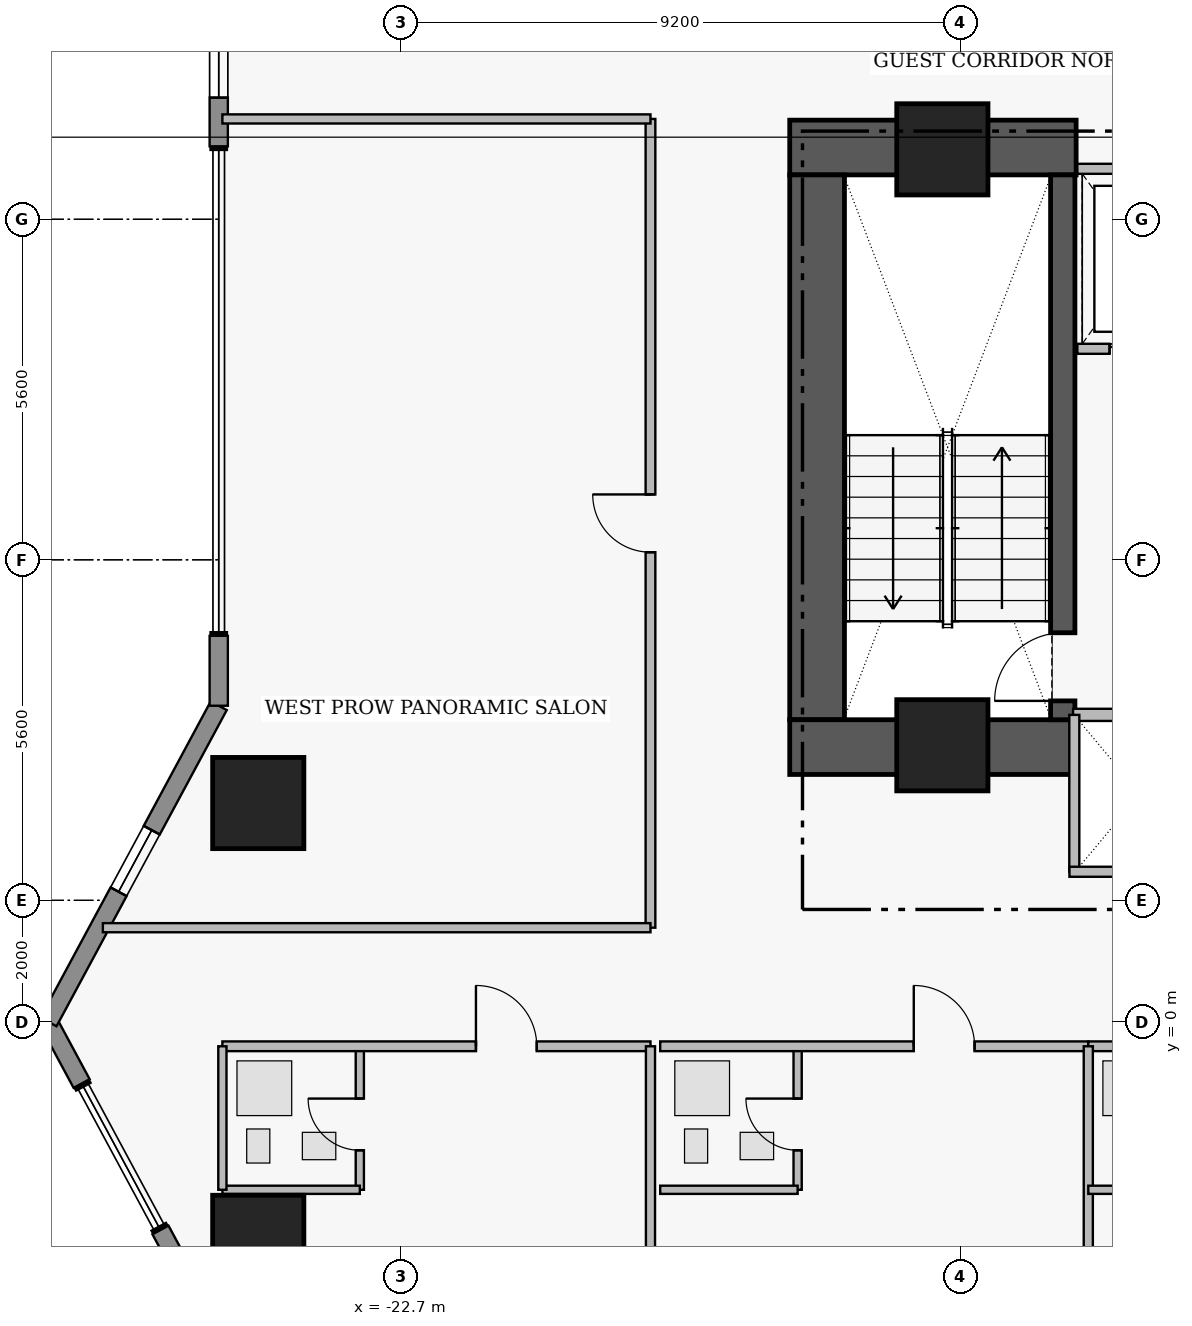
"""IFC4 building model, lengths in metres.
Left out: names, types, materials, properties, quantities, classifications, styles, units other than length and angle.
Written with IfcOpenShell. Run it as: python <this file> out.ifc"""

import sys

from ifc_helpers import new_model, si_unit, direction, frame, frame_2d, origin, origin_2d, place, context, subcontext, project, spatial, rectangle, extrude, element, fill, save


model = new_model("IFC4")
c1 = context("Model", 3, precision=1e-05, world=origin(), true_north=direction((0.0, 1.0)))
c2 = subcontext(c1, "Body", "Model", "MODEL_VIEW")
j1 = project(units=[si_unit("LENGTHUNIT", "METRE"), si_unit("PLANEANGLEUNIT", "RADIAN")], contexts=[c1])
p1 = place(None, origin())
s1 = spatial("IfcSite", under=j1, at=p1, CompositionType="ELEMENT")
p2 = place(p1, origin())
s2 = spatial("IfcBuilding", under=s1, at=p2, CompositionType="ELEMENT")
p3 = place(p2, frame((0.0, 0.0, 49.5)))
s3 = spatial("IfcBuildingStorey", under=s2, at=p3, CompositionType="ELEMENT", Elevation=49.5)
p4 = place(p3, frame((-16.31, 14.38, 0.0), z_axis=(0.0, 0.0, 1.0), x_axis=(1.0, 0.0, 0.0)))
e1 = element("IfcWall", 1, at=p4, inside=s3, PredefinedType="SHEAR", context=c2, shape_type="SweptSolid", body=[
    extrude(rectangle(XDim=4.71, YDim=0.9, at=frame_2d((2.355, 0.0))), origin(), (0.0, 0.0, 1.0), 3.46),
])
p5 = place(p3, frame((-15.86, 4.97, 0.0), z_axis=(0.0, 0.0, 1.0), x_axis=(0.0, 1.0, 0.0)))
e2 = element("IfcWall", 2, at=p5, inside=s3, PredefinedType="SHEAR", context=c2, shape_type="SweptSolid", body=[
    extrude(rectangle(XDim=8.96, YDim=0.9, at=frame_2d((4.48, 0.0))), origin(), (0.0, 0.0, 1.0), 3.46),
])
p6 = place(p3, frame((-16.31, 4.52, 0.0), z_axis=(0.0, 0.0, 1.0), x_axis=(1.0, 0.0, 0.0)))
e3 = element("IfcWall", 3, at=p6, inside=s3, PredefinedType="SHEAR", context=c2, shape_type="SweptSolid", body=[
    extrude(rectangle(XDim=4.71, YDim=0.9, at=frame_2d((2.355, 0.0))), origin(), (0.0, 0.0, 1.0), 3.46),
])
p7 = place(p3, frame((-11.82, 4.97, 0.0), z_axis=(0.0, 0.0, 1.0), x_axis=(0.0, 1.0, 0.0)))
e4 = element("IfcWall", 4, at=p7, inside=s3, PredefinedType="SHEAR", context=c2, shape_type="SweptSolid", body=[
    extrude(rectangle(XDim=8.96, YDim=0.4, at=frame_2d((4.48, 0.0))), origin(), (0.0, 0.0, 1.0), 3.46),
])
p8 = place(p7, frame((0.31, 0.0, 0.0)))
e5 = element("IfcOpeningElement", 5, at=p8, cuts=e4, PredefinedType="OPENING", context=c2, shape_type="SweptSolid", body=[
    extrude(rectangle(XDim=1.12, YDim=2.22, at=frame_2d((0.56, 1.11))), frame((0.0, 0.21, 0.0), z_axis=(0.0, -1.0, 0.0), x_axis=(1.0, 0.0, 0.0)), (0.0, 0.0, 1.0), 0.42),
])
for number, where, z_axis, x_axis in (
    (6, (-13.8, 14.35, 0.0), (0.0, 0.0, 1.0), (1.0, 0.0, 0.0)),
    (7, (-13.8, 4.55, 0.0), (0.0, 0.0, 1.0), (1.0, 0.0, 0.0)),
    (8, (-25.05, -3.6, 0.0), (0.0, 0.0, 1.0), (1.0, 0.0, 0.0)),
    (9, (-25.05, 3.6, 0.0), (0.0, 0.0, 1.0), (1.0, 0.0, 0.0)),
):
    element("IfcColumn", number, at=place(p3, frame(where, z_axis=z_axis, x_axis=x_axis)), inside=s3, PredefinedType="COLUMN", context=c2, shape_type="SweptSolid", body=[
        extrude(rectangle(XDim=1.5, YDim=1.5, at=origin_2d()), origin(), (0.0, 0.0, 1.0), 3.65),
    ])
p9 = place(p3, frame((-25.7, -5.2, 0.0), z_axis=(0.0, 0.0, 1.0), x_axis=(-0.474121438562, 0.88045946045, 0.0)))
e10 = element("IfcWall", 10, at=p9, inside=s3, PredefinedType="STANDARD", context=c2, shape_type="SweptSolid", body=[
    extrude(rectangle(XDim=2.021, YDim=0.3, at=frame_2d((1.01, 0.0))), origin(), (0.0, 0.0, 1.0), 3.43),
])
p10 = place(p3, frame((-27.955, -1.012, 0.0), z_axis=(0.0, 0.0, 1.0), x_axis=(-0.474099823035, 0.880471099922, 0.0)))
e11 = element("IfcWall", 11, at=p10, inside=s3, PredefinedType="STANDARD", context=c2, shape_type="SweptSolid", body=[
    extrude(rectangle(XDim=1.15, YDim=0.3, at=frame_2d((0.575, 0.0))), origin(), (0.0, 0.0, 1.0), 3.43),
])
p11 = place(p3, frame((-28.5, 0.0, 0.0), z_axis=(0.0, 0.0, 1.0), x_axis=(0.474109683532, 0.880465790352, 0.0)))
e12 = element("IfcWall", 12, at=p11, inside=s3, PredefinedType="STANDARD", context=c2, shape_type="SweptSolid", body=[
    extrude(rectangle(XDim=5.906, YDim=0.3, at=frame_2d((2.953, 0.0))), origin(), (0.0, 0.0, 1.0), 3.43),
])
p12 = place(p11, frame((2.432, 0.0, 0.95)))
e13 = element("IfcOpeningElement", 13, at=p12, cuts=e12, PredefinedType="OPENING", context=c2, shape_type="SweptSolid", body=[
    extrude(rectangle(XDim=1.15, YDim=1.55, at=frame_2d((0.575, 0.775))), frame((0.0, 0.16, 0.0), z_axis=(0.0, -1.0, 0.0), x_axis=(1.0, 0.0, 0.0)), (0.0, 0.0, 1.0), 0.32),
])
p13 = place(p3, frame((-25.7, 5.2, 0.0), z_axis=(0.0, 0.0, 1.0), x_axis=(0.0, 1.0, 0.0)))
e14 = element("IfcWall", 14, at=p13, inside=s3, PredefinedType="STANDARD", context=c2, shape_type="SweptSolid", body=[
    extrude(rectangle(XDim=1.15, YDim=0.3, at=frame_2d((0.575, 0.0))), origin(), (0.0, 0.0, 1.0), 3.43),
])
p14 = place(p3, frame((-25.7, 14.4, 0.0), z_axis=(0.0, 0.0, 1.0), x_axis=(0.0, 1.0, 0.0)))
e15 = element("IfcWall", 15, at=p14, inside=s3, PredefinedType="STANDARD", context=c2, shape_type="SweptSolid", body=[
    extrude(rectangle(XDim=5.1, YDim=0.3, at=frame_2d((2.55, 0.0))), origin(), (0.0, 0.0, 1.0), 3.43),
])
p15 = place(p14, frame((0.8, 0.0, 0.95)))
e16 = element("IfcOpeningElement", 16, at=p15, cuts=e15, PredefinedType="OPENING", context=c2, shape_type="SweptSolid", body=[
    extrude(rectangle(XDim=1.15, YDim=1.55, at=frame_2d((0.575, 0.775))), frame((0.0, 0.16, 0.0), z_axis=(0.0, -1.0, 0.0), x_axis=(1.0, 0.0, 0.0)), (0.0, 0.0, 1.0), 0.32),
])
p16 = place(p14, frame((2.905, 0.0, 0.95)))
e17 = element("IfcOpeningElement", 17, at=p16, cuts=e15, PredefinedType="OPENING", context=c2, shape_type="SweptSolid", body=[
    extrude(rectangle(XDim=1.15, YDim=1.55, at=frame_2d((0.575, 0.775))), frame((0.0, 0.16, 0.0), z_axis=(0.0, -1.0, 0.0), x_axis=(1.0, 0.0, 0.0)), (0.0, 0.0, 1.0), 0.32),
])
p17 = place(p3, frame((-11.58, 11.07, 0.0), z_axis=(0.0, 0.0, 1.0), x_axis=(1.0, 0.0, 0.0)))
e18 = element("IfcWall", 18, at=p17, inside=s3, PredefinedType="PARTITIONING", context=c2, shape_type="SweptSolid", body=[
    extrude(rectangle(XDim=2.16, YDim=0.165, at=frame_2d((1.08, 0.0))), origin(), (0.0, 0.0, 1.0), 3.43),
])
p18 = place(p17, frame((0.53, 0.0, 0.0)))
e19 = element("IfcOpeningElement", 19, at=p18, cuts=e18, PredefinedType="OPENING", context=c2, shape_type="SweptSolid", body=[
    extrude(rectangle(XDim=1.15, YDim=2.25, at=frame_2d((0.575, 1.125))), frame((0.0, 0.093, 0.0), z_axis=(0.0, -1.0, 0.0), x_axis=(1.0, 0.0, 0.0)), (0.0, 0.0, 1.0), 0.185),
])
p19 = place(p3, frame((-23.38, -2.76, 0.0), z_axis=(0.0, 0.0, 1.0), x_axis=(0.0, 1.0, 0.0)))
e20 = element("IfcWall", 20, at=p19, inside=s3, PredefinedType="PLUMBINGWALL", context=c2, shape_type="SweptSolid", body=[
    extrude(rectangle(XDim=2.36, YDim=0.135, at=frame_2d((1.18, 0.0))), origin(), (0.0, 0.0, 1.0), 3.43),
])
p20 = place(p19, frame((0.65, 0.0, 0.0)))
e21 = element("IfcOpeningElement", 21, at=p20, cuts=e20, PredefinedType="OPENING", context=c2, shape_type="SweptSolid", body=[
    extrude(rectangle(XDim=0.85, YDim=2.1, at=frame_2d((0.425, 1.05))), frame((0.0, 0.077, 0.0), z_axis=(0.0, -1.0, 0.0), x_axis=(1.0, 0.0, 0.0)), (0.0, 0.0, 1.0), 0.155),
])
p21 = place(p3, frame((-25.64, -0.4, 0.0), z_axis=(0.0, 0.0, 1.0), x_axis=(1.0, 0.0, 0.0)))
e22 = element("IfcWall", 22, at=p21, inside=s3, PredefinedType="PARTITIONING", context=c2, shape_type="SweptSolid", body=[
    extrude(rectangle(XDim=7.04, YDim=0.16, at=frame_2d((3.52, 0.0))), origin(), (0.0, 0.0, 1.0), 3.43),
])
p22 = place(p21, frame((4.17, 0.0, 0.0)))
e23 = element("IfcOpeningElement", 23, at=p22, cuts=e22, PredefinedType="OPENING", context=c2, shape_type="SweptSolid", body=[
    extrude(rectangle(XDim=1.0, YDim=2.15, at=frame_2d((0.5, 1.075))), frame((0.0, 0.09, 0.0), z_axis=(0.0, -1.0, 0.0), x_axis=(1.0, 0.0, 0.0)), (0.0, 0.0, 1.0), 0.18),
])
p23 = place(p3, frame((-16.18, -2.76, 0.0), z_axis=(0.0, 0.0, 1.0), x_axis=(0.0, 1.0, 0.0)))
e24 = element("IfcWall", 24, at=p23, inside=s3, PredefinedType="PLUMBINGWALL", context=c2, shape_type="SweptSolid", body=[
    extrude(rectangle(XDim=2.36, YDim=0.135, at=frame_2d((1.18, 0.0))), origin(), (0.0, 0.0, 1.0), 3.43),
])
p24 = place(p23, frame((0.65, 0.0, 0.0)))
e25 = element("IfcOpeningElement", 25, at=p24, cuts=e24, PredefinedType="OPENING", context=c2, shape_type="SweptSolid", body=[
    extrude(rectangle(XDim=0.85, YDim=2.1, at=frame_2d((0.425, 1.05))), frame((0.0, 0.077, 0.0), z_axis=(0.0, -1.0, 0.0), x_axis=(1.0, 0.0, 0.0)), (0.0, 0.0, 1.0), 0.155),
])
p25 = place(p3, frame((-18.44, -0.4, 0.0), z_axis=(0.0, 0.0, 1.0), x_axis=(1.0, 0.0, 0.0)))
e26 = element("IfcWall", 26, at=p25, inside=s3, PredefinedType="PARTITIONING", context=c2, shape_type="SweptSolid", body=[
    extrude(rectangle(XDim=7.04, YDim=0.16, at=frame_2d((3.52, 0.0))), origin(), (0.0, 0.0, 1.0), 3.43),
])
p26 = place(p25, frame((4.17, 0.0, 0.0)))
e27 = element("IfcOpeningElement", 27, at=p26, cuts=e26, PredefinedType="OPENING", context=c2, shape_type="SweptSolid", body=[
    extrude(rectangle(XDim=1.0, YDim=2.15, at=frame_2d((0.5, 1.075))), frame((0.0, 0.09, 0.0), z_axis=(0.0, -1.0, 0.0), x_axis=(1.0, 0.0, 0.0)), (0.0, 0.0, 1.0), 0.18),
])
p27 = place(p3, frame((-11.4, -0.4, 0.0), z_axis=(0.0, 0.0, 1.0), x_axis=(1.0, 0.0, 0.0)))
e28 = element("IfcWall", 28, at=p27, inside=s3, PredefinedType="PARTITIONING", context=c2, shape_type="SweptSolid", body=[
    extrude(rectangle(XDim=7.8, YDim=0.16, at=frame_2d((3.9, 0.0))), origin(), (0.0, 0.0, 1.0), 3.43),
])
p28 = place(p27, frame((4.55, 0.0, 0.0)))
e29 = element("IfcOpeningElement", 29, at=p28, cuts=e28, PredefinedType="OPENING", context=c2, shape_type="SweptSolid", body=[
    extrude(rectangle(XDim=1.0, YDim=2.15, at=frame_2d((0.5, 1.075))), frame((0.0, 0.09, 0.0), z_axis=(0.0, -1.0, 0.0), x_axis=(1.0, 0.0, 0.0)), (0.0, 0.0, 1.0), 0.18),
])
p29 = place(p3, frame((-18.6, 1.55, 0.0), z_axis=(0.0, 0.0, 1.0), x_axis=(0.0, 1.0, 0.0)))
e30 = element("IfcWall", 30, at=p29, inside=s3, PredefinedType="PARTITIONING", context=c2, shape_type="SweptSolid", body=[
    extrude(rectangle(XDim=13.3, YDim=0.16, at=frame_2d((6.65, 0.0))), origin(), (0.0, 0.0, 1.0), 3.43),
])
p30 = place(p29, frame((6.175, 0.0, 0.0)))
e31 = element("IfcOpeningElement", 31, at=p30, cuts=e30, PredefinedType="OPENING", context=c2, shape_type="SweptSolid", body=[
    extrude(rectangle(XDim=0.95, YDim=2.15, at=frame_2d((0.475, 1.075))), frame((0.0, 0.09, 0.0), z_axis=(0.0, -1.0, 0.0), x_axis=(1.0, 0.0, 0.0)), (0.0, 0.0, 1.0), 0.18),
])
p31 = place(p3, frame((-11.65, 5.05, 0.0), z_axis=(0.0, 0.0, 1.0), x_axis=(1.0, 0.0, 0.0)))
e32 = element("IfcWall", 32, at=p31, inside=s3, PredefinedType="PARTITIONING", context=c2, shape_type="SweptSolid", body=[
    extrude(rectangle(XDim=2.85, YDim=0.2, at=frame_2d((1.425, 0.0))), origin(), (0.0, 0.0, 1.0), 3.43),
])
p32 = place(p3, frame((-11.58, 14.03, 0.0), z_axis=(0.0, 0.0, 1.0), x_axis=(1.0, 0.0, 0.0)))
e33 = element("IfcWall", 33, at=p32, inside=s3, PredefinedType="PARTITIONING", context=c2, shape_type="SweptSolid", body=[
    extrude(rectangle(XDim=2.16, YDim=0.165, at=frame_2d((1.08, 0.0))), origin(), (0.0, 0.0, 1.0), 3.43),
])
p33 = place(p3, frame((-11.63, 2.47, 0.0), z_axis=(0.0, 0.0, 1.0), x_axis=(0.0, 1.0, 0.0)))
e34 = element("IfcWall", 34, at=p33, inside=s3, PredefinedType="PARTITIONING", context=c2, shape_type="SweptSolid", body=[
    extrude(rectangle(XDim=2.58, YDim=0.165, at=frame_2d((1.29, 0.0))), origin(), (0.0, 0.0, 1.0), 3.43),
])
p34 = place(p3, frame((-11.71, 2.47, 0.0), z_axis=(0.0, 0.0, 1.0), x_axis=(1.0, 0.0, 0.0)))
e35 = element("IfcWall", 35, at=p34, inside=s3, PredefinedType="PARTITIONING", context=c2, shape_type="SweptSolid", body=[
    extrude(rectangle(XDim=2.31, YDim=0.165, at=frame_2d((1.155, 0.0))), origin(), (0.0, 0.0, 1.0), 2.03),
])
p35 = place(p3, frame((-25.64, -2.76, 0.0), z_axis=(0.0, 0.0, 1.0), x_axis=(1.0, 0.0, 0.0)))
e36 = element("IfcWall", 36, at=p35, inside=s3, PredefinedType="PLUMBINGWALL", context=c2, shape_type="SweptSolid", body=[
    extrude(rectangle(XDim=2.26, YDim=0.135, at=frame_2d((1.13, 0.0))), origin(), (0.0, 0.0, 1.0), 3.43),
])
p36 = place(p3, frame((-25.64, -2.76, 0.0), z_axis=(0.0, 0.0, 1.0), x_axis=(0.0, 1.0, 0.0)))
e37 = element("IfcWall", 37, at=p36, inside=s3, PredefinedType="PLUMBINGWALL", context=c2, shape_type="SweptSolid", body=[
    extrude(rectangle(XDim=2.36, YDim=0.135, at=frame_2d((1.18, 0.0))), origin(), (0.0, 0.0, 1.0), 3.43),
])
p37 = place(p3, frame((-18.6, -23.02, 0.0), z_axis=(0.0, 0.0, 1.0), x_axis=(0.0, 1.0, 0.0)))
e38 = element("IfcWall", 38, at=p37, inside=s3, PredefinedType="PARTITIONING", context=c2, shape_type="SweptSolid", body=[
    extrude(rectangle(XDim=22.62, YDim=0.15, at=frame_2d((11.31, 0.0))), origin(), (0.0, 0.0, 1.0), 3.43),
])
p38 = place(p3, frame((-18.44, -2.76, 0.0), z_axis=(0.0, 0.0, 1.0), x_axis=(1.0, 0.0, 0.0)))
e39 = element("IfcWall", 39, at=p38, inside=s3, PredefinedType="PLUMBINGWALL", context=c2, shape_type="SweptSolid", body=[
    extrude(rectangle(XDim=2.26, YDim=0.135, at=frame_2d((1.13, 0.0))), origin(), (0.0, 0.0, 1.0), 3.43),
])
p39 = place(p3, frame((-11.4, -23.02, 0.0), z_axis=(0.0, 0.0, 1.0), x_axis=(0.0, 1.0, 0.0)))
e40 = element("IfcWall", 40, at=p39, inside=s3, PredefinedType="PARTITIONING", context=c2, shape_type="SweptSolid", body=[
    extrude(rectangle(XDim=22.62, YDim=0.15, at=frame_2d((11.31, 0.0))), origin(), (0.0, 0.0, 1.0), 3.43),
])
p40 = place(p3, frame((-11.4, -2.76, 0.0), z_axis=(0.0, 0.0, 1.0), x_axis=(1.0, 0.0, 0.0)))
e41 = element("IfcWall", 41, at=p40, inside=s3, PredefinedType="PLUMBINGWALL", context=c2, shape_type="SweptSolid", body=[
    extrude(rectangle(XDim=2.26, YDim=0.135, at=frame_2d((1.13, 0.0))), origin(), (0.0, 0.0, 1.0), 3.43),
])
p41 = place(p3, frame((-27.605, 1.55, 0.0), z_axis=(0.0, 0.0, 1.0), x_axis=(1.0, 0.0, 0.0)))
e42 = element("IfcWall", 42, at=p41, inside=s3, PredefinedType="PARTITIONING", context=c2, shape_type="SweptSolid", body=[
    extrude(rectangle(XDim=9.005, YDim=0.15, at=frame_2d((4.503, 0.0))), origin(), (0.0, 0.0, 1.0), 3.43),
])
p42 = place(p3, frame((-25.64, 14.85, 0.0), z_axis=(0.0, 0.0, 1.0), x_axis=(1.0, 0.0, 0.0)))
e43 = element("IfcWall", 43, at=p42, inside=s3, PredefinedType="PARTITIONING", context=c2, shape_type="SweptSolid", body=[
    extrude(rectangle(XDim=7.04, YDim=0.15, at=frame_2d((3.52, 0.0))), origin(), (0.0, 0.0, 1.0), 3.43),
])
p43 = place(p12, origin())
e44 = element("IfcWindow", 44, at=p43, inside=s3, PartitioningType="SINGLE_PANEL", PredefinedType="WINDOW", context=c2, shape_type="SweptSolid", body=[
    extrude(rectangle(XDim=1.15, YDim=1.55, at=frame_2d((0.575, 0.775))), frame((0.0, 0.03, 0.0), z_axis=(0.0, -1.0, 0.0), x_axis=(1.0, 0.0, 0.0)), (0.0, 0.0, 1.0), 0.06),
])
fill(e13, e44)
p44 = place(p15, origin())
e45 = element("IfcWindow", 45, at=p44, inside=s3, PartitioningType="SINGLE_PANEL", PredefinedType="WINDOW", context=c2, shape_type="SweptSolid", body=[
    extrude(rectangle(XDim=1.15, YDim=1.55, at=frame_2d((0.575, 0.775))), frame((0.0, 0.03, 0.0), z_axis=(0.0, -1.0, 0.0), x_axis=(1.0, 0.0, 0.0)), (0.0, 0.0, 1.0), 0.06),
])
fill(e16, e45)
p45 = place(p8, origin())
e46 = element("IfcDoor", 46, at=p45, inside=s3, OperationType="SINGLE_SWING_LEFT", PredefinedType="DOOR", context=c2, shape_type="SweptSolid", body=[
    extrude(rectangle(XDim=1.12, YDim=2.22, at=frame_2d((0.56, 1.11))), frame((0.0, 0.025, 0.0), z_axis=(0.0, -1.0, 0.0), x_axis=(1.0, 0.0, 0.0)), (0.0, 0.0, 1.0), 0.05),
])
fill(e5, e46)
p46 = place(p18, origin())
e47 = element("IfcDoor", 47, at=p46, inside=s3, OperationType="SLIDING_TO_LEFT", PredefinedType="DOOR", context=c2, shape_type="SweptSolid", body=[
    extrude(rectangle(XDim=1.15, YDim=2.25, at=frame_2d((0.575, 1.125))), frame((0.0, 0.025, 0.0), z_axis=(0.0, -1.0, 0.0), x_axis=(1.0, 0.0, 0.0)), (0.0, 0.0, 1.0), 0.05),
])
fill(e19, e47)
p47 = place(p20, origin())
e48 = element("IfcDoor", 48, at=p47, inside=s3, OperationType="SINGLE_SWING_RIGHT", PredefinedType="DOOR", context=c2, shape_type="SweptSolid", body=[
    extrude(rectangle(XDim=0.85, YDim=2.1, at=frame_2d((0.425, 1.05))), frame((0.0, 0.025, 0.0), z_axis=(0.0, -1.0, 0.0), x_axis=(1.0, 0.0, 0.0)), (0.0, 0.0, 1.0), 0.05),
])
fill(e21, e48)
p48 = place(p22, origin())
e49 = element("IfcDoor", 49, at=p48, inside=s3, OperationType="SINGLE_SWING_LEFT", PredefinedType="DOOR", context=c2, shape_type="SweptSolid", body=[
    extrude(rectangle(XDim=1.0, YDim=2.15, at=frame_2d((0.5, 1.075))), frame((0.0, 0.025, 0.0), z_axis=(0.0, -1.0, 0.0), x_axis=(1.0, 0.0, 0.0)), (0.0, 0.0, 1.0), 0.05),
])
fill(e23, e49)
p49 = place(p24, origin())
e50 = element("IfcDoor", 50, at=p49, inside=s3, OperationType="SINGLE_SWING_RIGHT", PredefinedType="DOOR", context=c2, shape_type="SweptSolid", body=[
    extrude(rectangle(XDim=0.85, YDim=2.1, at=frame_2d((0.425, 1.05))), frame((0.0, 0.025, 0.0), z_axis=(0.0, -1.0, 0.0), x_axis=(1.0, 0.0, 0.0)), (0.0, 0.0, 1.0), 0.05),
])
fill(e25, e50)
p50 = place(p26, origin())
e51 = element("IfcDoor", 51, at=p50, inside=s3, OperationType="SINGLE_SWING_LEFT", PredefinedType="DOOR", context=c2, shape_type="SweptSolid", body=[
    extrude(rectangle(XDim=1.0, YDim=2.15, at=frame_2d((0.5, 1.075))), frame((0.0, 0.025, 0.0), z_axis=(0.0, -1.0, 0.0), x_axis=(1.0, 0.0, 0.0)), (0.0, 0.0, 1.0), 0.05),
])
fill(e27, e51)
p51 = place(p30, origin())
e52 = element("IfcDoor", 52, at=p51, inside=s3, OperationType="SINGLE_SWING_RIGHT", PredefinedType="DOOR", context=c2, shape_type="SweptSolid", body=[
    extrude(rectangle(XDim=0.95, YDim=2.15, at=frame_2d((0.475, 1.075))), frame((0.0, 0.025, 0.0), z_axis=(0.0, -1.0, 0.0), x_axis=(1.0, 0.0, 0.0)), (0.0, 0.0, 1.0), 0.05),
])
fill(e31, e52)
save(model, sys.argv[1])
